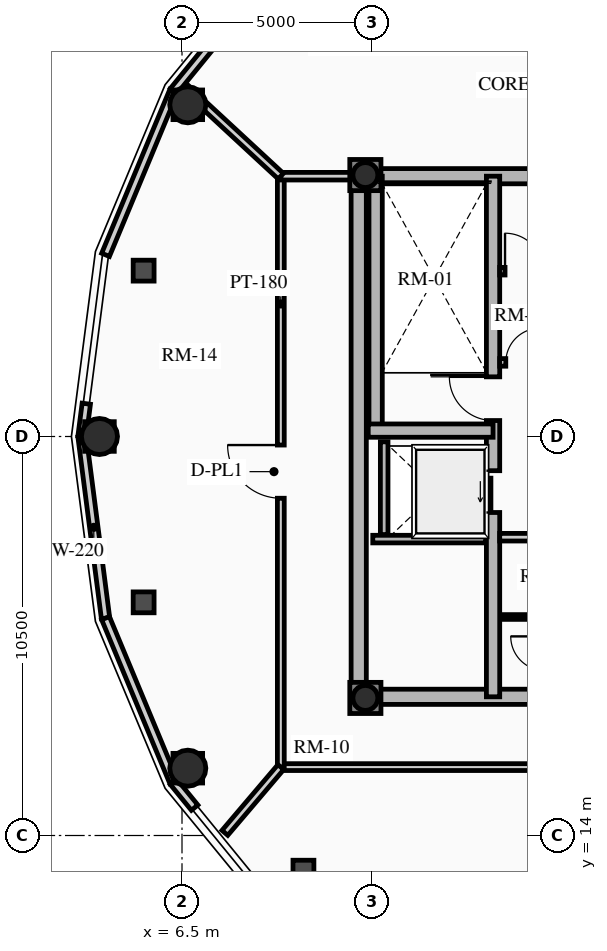
"""IFC4 building model, lengths in metres.
Left out: names, types, materials, properties, quantities, classifications, styles, units other than length and angle.
Written with IfcOpenShell. Run it as: python <this file> out.ifc"""

import sys

from ifc_helpers import new_model, si_unit, direction, frame, frame_2d, origin, origin_2d, place, context, subcontext, project, spatial, rectangle, circle, hollow_circle, extrude, source, transform, mapped, element, fill, save


model = new_model("IFC4")
c1 = context("Model", 3, precision=1e-05, world=origin(), true_north=direction((0.0, 1.0)))
c2 = subcontext(c1, "Body", "Model", "MODEL_VIEW")
j1 = project(units=[si_unit("LENGTHUNIT", "METRE"), si_unit("PLANEANGLEUNIT", "RADIAN")], contexts=[c1])
p1 = place(None, origin())
s1 = spatial("IfcSite", under=j1, at=p1, CompositionType="ELEMENT")
p2 = place(p1, origin())
s2 = spatial("IfcBuilding", under=s1, at=p2, CompositionType="ELEMENT")
p3 = place(p2, frame((0.0, 0.0, 240.33)))
s3 = spatial("IfcBuildingStorey", under=s2, at=p3, CompositionType="ELEMENT", Elevation=240.33)
p4 = place(p3, frame((11.15, 17.45, 0.0), z_axis=(0.0, 0.0, 1.0), x_axis=(0.0, 1.0, 0.0)))
e1 = element("IfcWall", 1, at=p4, inside=s3, PredefinedType="SHEAR", context=c2, shape_type="SweptSolid", body=[
    extrude(rectangle(XDim=14.1, YDim=0.4, at=frame_2d((7.05, 0.0))), origin(), (0.0, 0.0, 1.0), 4.5),
])
p5 = place(p3, frame((11.15, 17.65, 0.0), z_axis=(0.0, 0.0, 1.0), x_axis=(1.0, 0.0, 0.0)))
e2 = element("IfcWall", 2, at=p5, inside=s3, PredefinedType="SHEAR", context=c2, shape_type="SweptSolid", body=[
    extrude(rectangle(XDim=10.7, YDim=0.4, at=frame_2d((5.35, 0.0))), origin(), (0.0, 0.0, 1.0), 4.5),
])
m1 = source(origin(), c2, "Body", "SweptSolid", [
    extrude(rectangle(XDim=1.5, YDim=2.02, at=frame_2d((0.75, 1.01))), frame((0.0, 0.21, 0.0), z_axis=(0.0, -1.0, 0.0), x_axis=(1.0, 0.0, 0.0)), (0.0, 0.0, 1.0), 0.42),
])
p6 = place(p5, frame((5.45, 0.0, 0.0)))
e3 = element("IfcOpeningElement", 3, at=p6, cuts=e2, PredefinedType="OPENING", context=c2, shape_type="MappedRepresentation", body=[
    mapped(m1, transform((0.0, 0.0, 0.0), x_axis=(1.0, 0.0, 0.0), y_axis=(0.0, 1.0, 0.0), z_axis=(0.0, 0.0, 1.0), scale=1.0)),
])
p7 = place(p3, frame((11.15, 31.35, 0.0), z_axis=(0.0, 0.0, 1.0), x_axis=(1.0, 0.0, 0.0)))
e4 = element("IfcWall", 4, at=p7, inside=s3, PredefinedType="SHEAR", context=c2, shape_type="SweptSolid", body=[
    extrude(rectangle(XDim=10.7, YDim=0.4, at=frame_2d((5.35, 0.0))), origin(), (0.0, 0.0, 1.0), 4.5),
])
p8 = place(p7, frame((4.6, 0.0, 0.0)))
e5 = element("IfcOpeningElement", 5, at=p8, cuts=e4, PredefinedType="OPENING", context=c2, shape_type="MappedRepresentation", body=[
    mapped(m1, transform((0.0, 0.0, 0.0), x_axis=(1.0, 0.0, 0.0), y_axis=(0.0, 1.0, 0.0), z_axis=(0.0, 0.0, 1.0), scale=1.0)),
])
p9 = place(p3, frame((14.685, 17.65, 0.0), z_axis=(0.0, 0.0, 1.0), x_axis=(0.0, 1.0, 0.0)))
e6 = element("IfcWall", 6, at=p9, inside=s3, PredefinedType="SHEAR", context=c2, shape_type="SweptSolid", body=[
    extrude(rectangle(XDim=13.7, YDim=0.35, at=frame_2d((6.85, 0.0))), origin(), (0.0, 0.0, 1.0), 4.5),
])
m2 = source(origin(), c2, "Body", "SweptSolid", [
    extrude(rectangle(XDim=1.1, YDim=2.015, at=frame_2d((0.55, 1.007))), frame((0.0, 0.185, 0.0), z_axis=(0.0, -1.0, 0.0), x_axis=(1.0, 0.0, 0.0)), (0.0, 0.0, 1.0), 0.37),
])
p10 = place(p9, frame((4.85, 0.0, 0.0)))
e7 = element("IfcOpeningElement", 7, at=p10, cuts=e6, PredefinedType="OPENING", context=c2, shape_type="MappedRepresentation", body=[
    mapped(m2, transform((0.0, 0.0, 0.0), x_axis=(1.0, 0.0, 0.0), y_axis=(0.0, 1.0, 0.0), z_axis=(0.0, 0.0, 1.0), scale=1.0)),
])
m3 = source(origin(), c2, "Body", "SweptSolid", [
    extrude(rectangle(XDim=1.15, YDim=2.02, at=frame_2d((0.575, 1.01))), frame((0.0, 0.185, 0.0), z_axis=(0.0, -1.0, 0.0), x_axis=(1.0, 0.0, 0.0)), (0.0, 0.0, 1.0), 0.37),
])
p11 = place(p9, frame((7.27, 0.0, 0.0)))
e8 = element("IfcOpeningElement", 8, at=p11, cuts=e6, PredefinedType="OPENING", context=c2, shape_type="MappedRepresentation", body=[
    mapped(m3, transform((0.0, 0.0, 0.0), x_axis=(1.0, 0.0, 0.0), y_axis=(0.0, 1.0, 0.0), z_axis=(0.0, 0.0, 1.0), scale=1.0)),
])
p12 = place(p3, frame((11.595, 24.655, 0.0), z_axis=(0.0, 0.0, 1.0), x_axis=(0.0, 1.0, 0.0)))
e9 = element("IfcWall", 9, at=p12, inside=s3, PredefinedType="SHEAR", context=c2, shape_type="SweptSolid", body=[
    extrude(rectangle(XDim=6.695, YDim=0.35, at=frame_2d((3.348, 0.0))), origin(), (0.0, 0.0, 1.0), 4.5),
])
p13 = place(p3, frame((11.4, 24.655, 0.0), z_axis=(0.0, 0.0, 1.0), x_axis=(1.0, 0.0, 0.0)))
e10 = element("IfcWall", 10, at=p13, inside=s3, PredefinedType="SHEAR", context=c2, shape_type="SweptSolid", body=[
    extrude(rectangle(XDim=3.285, YDim=0.35, at=frame_2d((1.643, 0.0))), origin(), (0.0, 0.0, 1.0), 4.5),
])
for number, where, z_axis, x_axis in (
    (11, (11.325, 17.62, 0.0), (0.0, 0.0, 1.0), (1.0, 0.0, 0.0)),
    (12, (11.325, 31.38, 0.0), (0.0, 0.0, 1.0), (1.0, 0.0, 0.0)),
):
    element("IfcColumn", number, at=place(p3, frame(where, z_axis=z_axis, x_axis=x_axis)), inside=s3, PredefinedType="COLUMN", context=c2, shape_type="SweptSolid", body=[
        extrude(hollow_circle(Radius=0.33, WallThickness=0.025, at=origin_2d()), origin(), (0.0, 0.0, 1.0), 4.5),
    ])
for number, where, z_axis, x_axis in (
    (13, (6.653, 33.229, 0.0), (0.0, 0.0, 1.0), (1.0, 0.0, 0.0)),
    (14, (4.328, 24.5, 0.0), (0.0, 0.0, 1.0), (1.0, 0.0, 0.0)),
    (15, (6.653, 15.771, 0.0), (0.0, 0.0, 1.0), (1.0, 0.0, 0.0)),
):
    element("IfcColumn", number, at=place(p3, frame(where, z_axis=z_axis, x_axis=x_axis)), inside=s3, PredefinedType="COLUMN", context=c2, shape_type="SweptSolid", body=[
        extrude(circle(Radius=0.475, at=origin_2d()), origin(), (0.0, 0.0, 1.0), 4.5),
    ])
p14 = place(p3, frame((6.282, 33.593, 0.0), z_axis=(0.0, 0.0, 1.0), x_axis=(0.632467166636, 0.774587169483, 0.0)))
e16 = element("IfcWall", 16, at=p14, inside=s3, PredefinedType="SOLIDWALL", context=c2, shape_type="SweptSolid", body=[
    extrude(rectangle(XDim=4.418, YDim=0.22, at=frame_2d((2.209, 0.0))), origin(), (0.0, 0.0, 1.0), 3.556),
])
p15 = place(p3, frame((4.488, 29.281, 0.0), z_axis=(0.0, 0.0, 1.0), x_axis=(0.384036305194, 0.923317993052, 0.0)))
e17 = element("IfcWall", 17, at=p15, inside=s3, PredefinedType="SOLIDWALL", context=c2, shape_type="SweptSolid", body=[
    extrude(rectangle(XDim=4.671, YDim=0.22, at=frame_2d((2.335, 0.0))), origin(), (0.0, 0.0, 1.0), 3.556),
])
p16 = place(p3, frame((3.87, 24.5, 0.0), z_axis=(0.0, 0.0, 1.0), x_axis=(0.128247365719, 0.991742211054, 0.0)))
e18 = element("IfcWall", 18, at=p16, inside=s3, PredefinedType="SOLIDWALL", context=c2, shape_type="SweptSolid", body=[
    extrude(rectangle(XDim=0.87, YDim=0.22, at=frame_2d((0.435, 0.0))), origin(), (0.0, 0.0, 1.0), 3.556),
])
p17 = place(p3, frame((4.488, 19.719, 0.0), z_axis=(0.0, 0.0, 1.0), x_axis=(-0.128241318541, 0.991742993027, 0.0)))
e19 = element("IfcWall", 19, at=p17, inside=s3, PredefinedType="SOLIDWALL", context=c2, shape_type="SweptSolid", body=[
    extrude(rectangle(XDim=4.82, YDim=0.22, at=frame_2d((2.41, 0.0))), origin(), (0.0, 0.0, 1.0), 3.556),
])
p18 = place(p3, frame((6.282, 15.407, 0.0), z_axis=(0.0, 0.0, 1.0), x_axis=(-0.384036305194, 0.923317993052, 0.0)))
e20 = element("IfcWall", 20, at=p18, inside=s3, PredefinedType="SOLIDWALL", context=c2, shape_type="SweptSolid", body=[
    extrude(rectangle(XDim=4.671, YDim=0.22, at=frame_2d((2.335, 0.0))), origin(), (0.0, 0.0, 1.0), 3.556),
])
p19 = place(p3, frame((6.832, 14.733, 0.0), z_axis=(0.0, 0.0, 1.0), x_axis=(-0.632534570862, 0.774532127587, 0.0)))
e21 = element("IfcWall", 21, at=p19, inside=s3, PredefinedType="SOLIDWALL", context=c2, shape_type="SweptSolid", body=[
    extrude(rectangle(XDim=0.87, YDim=0.22, at=frame_2d((0.435, 0.0))), origin(), (0.0, 0.0, 1.0), 3.556),
])
p20 = place(p3, frame((11.52, 21.8, 0.0), z_axis=(0.0, 0.0, 1.0), x_axis=(1.0, 0.0, 0.0)))
e22 = element("IfcWall", 22, at=p20, inside=s3, PredefinedType="SHEAR", context=c2, shape_type="SweptSolid", body=[
    extrude(rectangle(XDim=2.97, YDim=0.2, at=frame_2d((1.485, 0.0))), origin(), (0.0, 0.0, 1.0), 4.5),
])
p21 = place(p3, frame((11.82, 21.92, 0.0), z_axis=(0.0, 0.0, 1.0), x_axis=(0.0, 1.0, 0.0)))
e23 = element("IfcWall", 23, at=p21, inside=s3, PredefinedType="SHEAR", context=c2, shape_type="SweptSolid", body=[
    extrude(rectangle(XDim=2.44, YDim=0.2, at=frame_2d((1.22, 0.0))), origin(), (0.0, 0.0, 1.0), 4.5),
])
p22 = place(p3, frame((14.86, 21.85, 0.0), z_axis=(0.0, 0.0, 1.0), x_axis=(1.0, 0.0, 0.0)))
e24 = element("IfcWall", 24, at=p22, inside=s3, PredefinedType="PARTITIONING", context=c2, shape_type="SweptSolid", body=[
    extrude(rectangle(XDim=3.28, YDim=0.2, at=frame_2d((1.64, 0.0))), origin(), (0.0, 0.0, 1.0), 4.185),
])
m4 = source(origin(), c2, "Body", "SweptSolid", [
    extrude(rectangle(XDim=1.5, YDim=2.02, at=frame_2d((0.75, 1.01))), frame((0.0, 0.11, 0.0), z_axis=(0.0, -1.0, 0.0), x_axis=(1.0, 0.0, 0.0)), (0.0, 0.0, 1.0), 0.22),
])
p23 = place(p22, frame((1.55, 0.0, 0.0)))
e25 = element("IfcOpeningElement", 25, at=p23, cuts=e24, PredefinedType="OPENING", context=c2, shape_type="MappedRepresentation", body=[
    mapped(m4, transform((0.0, 0.0, 0.0), x_axis=(1.0, 0.0, 0.0), y_axis=(0.0, 1.0, 0.0), z_axis=(0.0, 0.0, 1.0), scale=1.0)),
])
p24 = place(p3, frame((14.86, 26.45, 0.0), z_axis=(0.0, 0.0, 1.0), x_axis=(1.0, 0.0, 0.0)))
e26 = element("IfcWall", 26, at=p24, inside=s3, PredefinedType="PARTITIONING", context=c2, shape_type="SweptSolid", body=[
    extrude(rectangle(XDim=3.28, YDim=0.2, at=frame_2d((1.64, 0.0))), origin(), (0.0, 0.0, 1.0), 4.185),
])
m5 = source(origin(), c2, "Body", "SweptSolid", [
    extrude(rectangle(XDim=0.9, YDim=2.005, at=frame_2d((0.45, 1.002))), frame((0.0, 0.11, 0.0), z_axis=(0.0, -1.0, 0.0), x_axis=(1.0, 0.0, 0.0)), (0.0, 0.0, 1.0), 0.22),
])
p25 = place(p24, frame((0.16, 0.0, 0.0)))
e27 = element("IfcOpeningElement", 27, at=p25, cuts=e26, PredefinedType="OPENING", context=c2, shape_type="MappedRepresentation", body=[
    mapped(m5, transform((0.0, 0.0, 0.0), x_axis=(1.0, 0.0, 0.0), y_axis=(0.0, 1.0, 0.0), z_axis=(0.0, 0.0, 1.0), scale=1.0)),
])
p26 = place(p3, frame((14.86, 28.85, 0.0), z_axis=(0.0, 0.0, 1.0), x_axis=(1.0, 0.0, 0.0)))
e28 = element("IfcWall", 28, at=p26, inside=s3, PredefinedType="PARTITIONING", context=c2, shape_type="SweptSolid", body=[
    extrude(rectangle(XDim=3.28, YDim=0.2, at=frame_2d((1.64, 0.0))), origin(), (0.0, 0.0, 1.0), 4.185),
])
m6 = source(origin(), c2, "Body", "SweptSolid", [
    extrude(rectangle(XDim=1.0, YDim=2.015, at=frame_2d((0.5, 1.007))), frame((0.0, 0.11, 0.0), z_axis=(0.0, -1.0, 0.0), x_axis=(1.0, 0.0, 0.0)), (0.0, 0.0, 1.0), 0.22),
])
p27 = place(p26, frame((0.14, 0.0, 0.0)))
e29 = element("IfcOpeningElement", 29, at=p27, cuts=e28, PredefinedType="OPENING", context=c2, shape_type="MappedRepresentation", body=[
    mapped(m6, transform((0.0, 0.0, 0.0), x_axis=(1.0, 0.0, 0.0), y_axis=(0.0, 1.0, 0.0), z_axis=(0.0, 0.0, 1.0), scale=1.0)),
])
p28 = place(p26, frame((2.05, 0.0, 0.0)))
e30 = element("IfcOpeningElement", 30, at=p28, cuts=e28, PredefinedType="OPENING", context=c2, shape_type="MappedRepresentation", body=[
    mapped(m5, transform((0.0, 0.0, 0.0), x_axis=(1.0, 0.0, 0.0), y_axis=(0.0, 1.0, 0.0), z_axis=(0.0, 0.0, 1.0), scale=1.0)),
])
p29 = place(p3, frame((14.88, 19.75, 0.0), z_axis=(0.0, 0.0, 1.0), x_axis=(1.0, 0.0, 0.0)))
e31 = element("IfcWall", 31, at=p29, inside=s3, PredefinedType="PARTITIONING", context=c2, shape_type="SweptSolid", body=[
    extrude(rectangle(XDim=1.1, YDim=0.125, at=frame_2d((0.55, 0.0))), origin(), (0.0, 0.0, 1.0), 4.185),
])
p30 = place(p3, frame((9.1, 15.8, 0.0), z_axis=(0.0, 0.0, 1.0), x_axis=(1.0, 0.0, 0.0)))
e32 = element("IfcWall", 32, at=p30, inside=s3, PredefinedType="PARTITIONING", context=c2, shape_type="SweptSolid", body=[
    extrude(rectangle(XDim=14.8, YDim=0.18, at=frame_2d((7.4, 0.0))), origin(), (0.0, 0.0, 1.0), 3.476),
])
m7 = source(origin(), c2, "Body", "SweptSolid", [
    extrude(rectangle(XDim=1.4, YDim=2.02, at=frame_2d((0.7, 1.01))), frame((0.0, 0.1, 0.0), z_axis=(0.0, -1.0, 0.0), x_axis=(1.0, 0.0, 0.0)), (0.0, 0.0, 1.0), 0.2),
])
p31 = place(p30, frame((6.7, 0.0, 0.0)))
e33 = element("IfcOpeningElement", 33, at=p31, cuts=e32, PredefinedType="OPENING", context=c2, shape_type="MappedRepresentation", body=[
    mapped(m7, transform((0.0, 0.0, 0.0), x_axis=(1.0, 0.0, 0.0), y_axis=(0.0, 1.0, 0.0), z_axis=(0.0, 0.0, 1.0), scale=1.0)),
])
p32 = place(p3, frame((9.1, 15.8, 0.0), z_axis=(0.0, 0.0, 1.0), x_axis=(0.0, 1.0, 0.0)))
e34 = element("IfcWall", 34, at=p32, inside=s3, PredefinedType="PARTITIONING", context=c2, shape_type="SweptSolid", body=[
    extrude(rectangle(XDim=15.55, YDim=0.18, at=frame_2d((7.775, 0.0))), origin(), (0.0, 0.0, 1.0), 3.476),
])
p33 = place(p32, frame((7.075, 0.0, 0.0)))
e35 = element("IfcOpeningElement", 35, at=p33, cuts=e34, PredefinedType="OPENING", context=c2, shape_type="MappedRepresentation", body=[
    mapped(m7, transform((0.0, 0.0, 0.0), x_axis=(1.0, 0.0, 0.0), y_axis=(0.0, 1.0, 0.0), z_axis=(0.0, 0.0, 1.0), scale=1.0)),
])
p34 = place(p3, frame((9.1, 31.35, 0.0), z_axis=(0.0, 0.0, 1.0), x_axis=(1.0, 0.0, 0.0)))
e36 = element("IfcWall", 36, at=p34, inside=s3, PredefinedType="PARTITIONING", context=c2, shape_type="SweptSolid", body=[
    extrude(rectangle(XDim=1.85, YDim=0.2, at=frame_2d((0.925, 0.0))), origin(), (0.0, 0.0, 1.0), 3.476),
])
p35 = place(p3, frame((9.1, 31.35, 0.0), z_axis=(0.0, 0.0, 1.0), x_axis=(-0.733869107154, 0.679290904963, 0.0)))
e37 = element("IfcWall", 37, at=p35, inside=s3, PredefinedType="PARTITIONING", context=c2, shape_type="SweptSolid", body=[
    extrude(rectangle(XDim=3.409, YDim=0.2, at=frame_2d((1.704, 0.0))), origin(), (0.0, 0.0, 1.0), 3.476),
])
p36 = place(p3, frame((9.1, 15.8, 0.0), z_axis=(0.0, 0.0, 1.0), x_axis=(-0.647910417059, -0.761716542729, 0.0)))
e38 = element("IfcWall", 38, at=p36, inside=s3, PredefinedType="PARTITIONING", context=c2, shape_type="SweptSolid", body=[
    extrude(rectangle(XDim=2.272, YDim=0.2, at=frame_2d((1.136, 0.0))), origin(), (0.0, 0.0, 1.0), 3.556),
])
m8 = source(origin(), c2, "Body", "SweptSolid", [
    extrude(rectangle(XDim=1.1, YDim=2.015, at=frame_2d((0.55, 1.007))), frame((0.0, 0.025, 0.0), z_axis=(0.0, -1.0, 0.0), x_axis=(1.0, 0.0, 0.0)), (0.0, 0.0, 1.0), 0.05),
])
p37 = place(p10, origin())
e39 = element("IfcDoor", 39, at=p37, inside=s3, OperationType="SLIDING_TO_LEFT", PredefinedType="DOOR", context=c2, shape_type="MappedRepresentation", body=[
    mapped(m8, transform((0.0, 0.0, 0.0), x_axis=(1.0, 0.0, 0.0), y_axis=(0.0, 1.0, 0.0), z_axis=(0.0, 0.0, 1.0), scale=1.0)),
])
fill(e7, e39)
m9 = source(origin(), c2, "Body", "SweptSolid", [
    extrude(rectangle(XDim=1.15, YDim=2.02, at=frame_2d((0.575, 1.01))), frame((0.0, 0.025, 0.0), z_axis=(0.0, -1.0, 0.0), x_axis=(1.0, 0.0, 0.0)), (0.0, 0.0, 1.0), 0.05),
])
p38 = place(p11, origin())
e40 = element("IfcDoor", 40, at=p38, inside=s3, OperationType="SINGLE_SWING_RIGHT", PredefinedType="DOOR", context=c2, shape_type="MappedRepresentation", body=[
    mapped(m9, transform((0.0, 0.0, 0.0), x_axis=(1.0, 0.0, 0.0), y_axis=(0.0, 1.0, 0.0), z_axis=(0.0, 0.0, 1.0), scale=1.0)),
])
fill(e8, e40)
m10 = source(origin(), c2, "Body", "SweptSolid", [
    extrude(rectangle(XDim=0.9, YDim=2.005, at=frame_2d((0.45, 1.002))), frame((0.0, 0.025, 0.0), z_axis=(0.0, -1.0, 0.0), x_axis=(1.0, 0.0, 0.0)), (0.0, 0.0, 1.0), 0.05),
])
p39 = place(p25, origin())
e41 = element("IfcDoor", 41, at=p39, inside=s3, OperationType="SINGLE_SWING_RIGHT", PredefinedType="DOOR", context=c2, shape_type="MappedRepresentation", body=[
    mapped(m10, transform((0.0, 0.0, 0.0), x_axis=(1.0, 0.0, 0.0), y_axis=(0.0, 1.0, 0.0), z_axis=(0.0, 0.0, 1.0), scale=1.0)),
])
fill(e27, e41)
m11 = source(origin(), c2, "Body", "SweptSolid", [
    extrude(rectangle(XDim=1.0, YDim=2.015, at=frame_2d((0.5, 1.007))), frame((0.0, 0.025, 0.0), z_axis=(0.0, -1.0, 0.0), x_axis=(1.0, 0.0, 0.0)), (0.0, 0.0, 1.0), 0.05),
])
p40 = place(p27, origin())
e42 = element("IfcDoor", 42, at=p40, inside=s3, OperationType="SINGLE_SWING_LEFT", PredefinedType="DOOR", context=c2, shape_type="MappedRepresentation", body=[
    mapped(m11, transform((0.0, 0.0, 0.0), x_axis=(1.0, 0.0, 0.0), y_axis=(0.0, 1.0, 0.0), z_axis=(0.0, 0.0, 1.0), scale=1.0)),
])
fill(e29, e42)
m12 = source(origin(), c2, "Body", "SweptSolid", [
    extrude(rectangle(XDim=1.4, YDim=2.02, at=frame_2d((0.7, 1.01))), frame((0.0, 0.025, 0.0), z_axis=(0.0, -1.0, 0.0), x_axis=(1.0, 0.0, 0.0)), (0.0, 0.0, 1.0), 0.05),
])
p41 = place(p33, origin())
e43 = element("IfcDoor", 43, at=p41, inside=s3, OperationType="SINGLE_SWING_RIGHT", PredefinedType="DOOR", context=c2, shape_type="MappedRepresentation", body=[
    mapped(m12, transform((0.0, 0.0, 0.0), x_axis=(1.0, 0.0, 0.0), y_axis=(0.0, 1.0, 0.0), z_axis=(0.0, 0.0, 1.0), scale=1.0)),
])
fill(e35, e43)
save(model, sys.argv[1])
